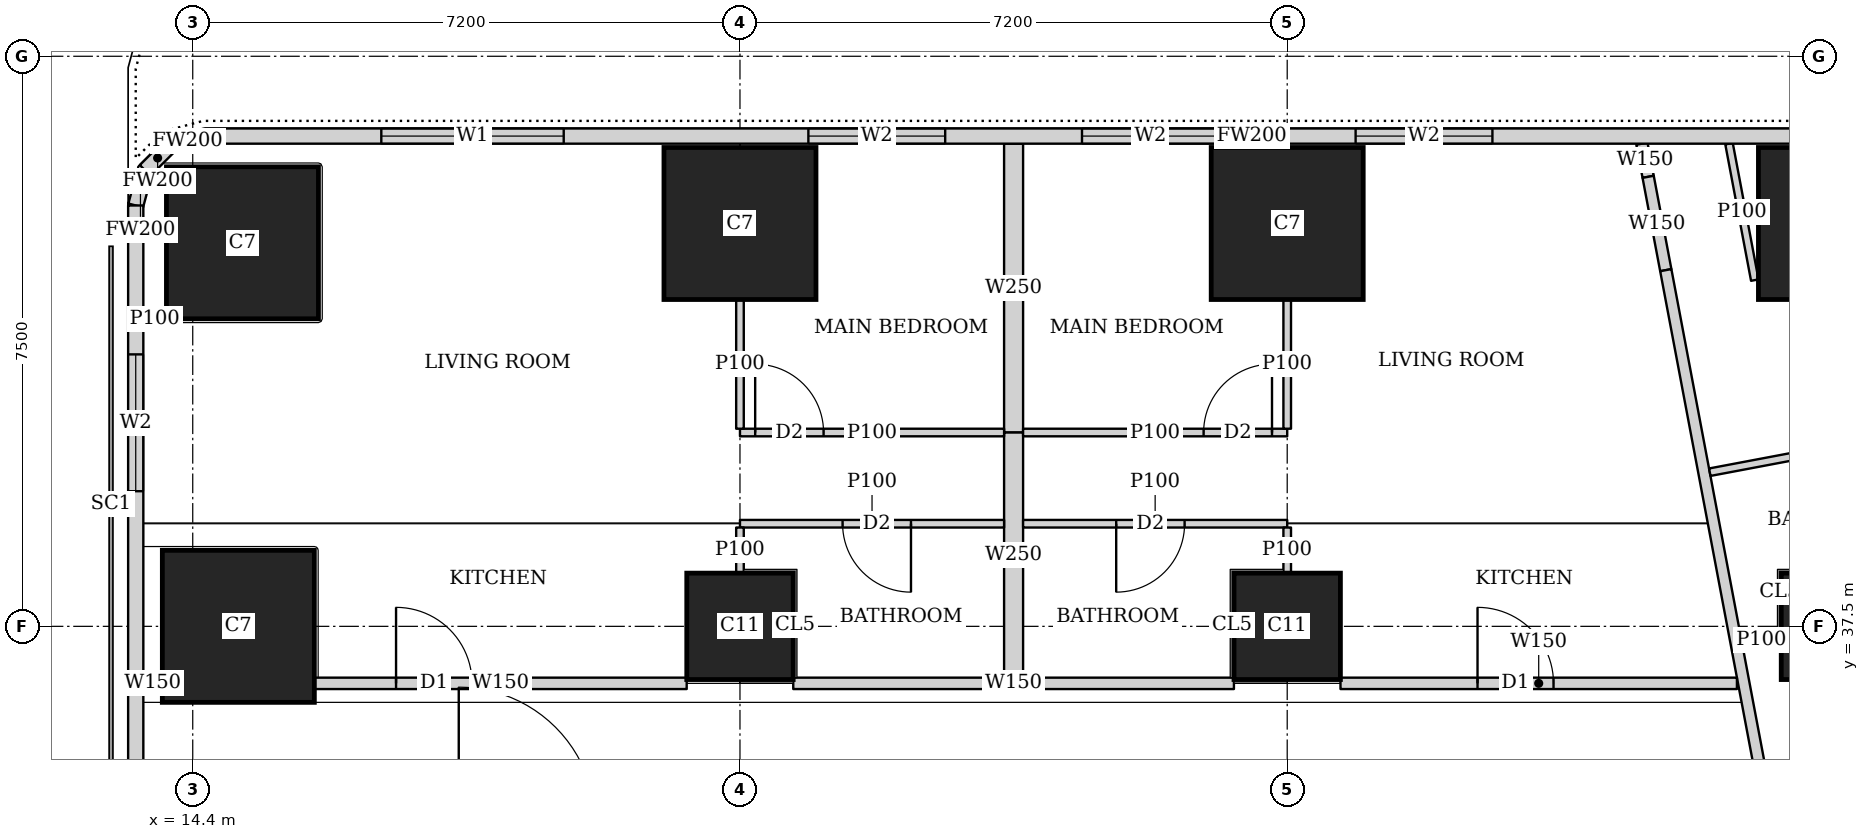
"""IFC4 building model, lengths in metres.
Left out: names, types, materials, properties, quantities, classifications, styles, units other than length and angle.
Written with IfcOpenShell. Run it as: python <this file> out.ifc"""

import sys

from ifc_helpers import new_model, si_unit, direction, frame, frame_2d, origin, origin_2d, place, context, subcontext, project, spatial, rectangle, extrude, element, fill, save


model = new_model("IFC4")
c1 = context("Model", 3, precision=1e-05, world=origin(), true_north=direction((0.0, 1.0)))
c2 = subcontext(c1, "Body", "Model", "MODEL_VIEW")
j1 = project(units=[si_unit("LENGTHUNIT", "METRE"), si_unit("PLANEANGLEUNIT", "RADIAN")], contexts=[c1])
p1 = place(None, origin())
s1 = spatial("IfcSite", under=j1, at=p1, CompositionType="ELEMENT")
p2 = place(p1, origin())
s2 = spatial("IfcBuilding", under=s1, at=p2, CompositionType="ELEMENT")
p3 = place(p2, frame((0.0, 0.0, 251.6)))
s3 = spatial("IfcBuildingStorey", under=s2, at=p3, CompositionType="ELEMENT", Elevation=251.6)
p4 = place(p3, frame((15.0, 37.5, 0.0), z_axis=(0.0, 0.0, 1.0), x_axis=(1.0, 0.0, 0.0)))
e1 = element("IfcColumn", 1, at=p4, inside=s3, PredefinedType="COLUMN", context=c2, shape_type="SweptSolid", body=[
    extrude(rectangle(XDim=2.0, YDim=2.0, at=origin_2d()), origin(), (0.0, 0.0, 1.0), 3.75),
])
for number, where, z_axis, x_axis in (
    (2, (21.6, 37.5, 0.0), (0.0, 0.0, 1.0), (1.0, 0.0, 0.0)),
    (3, (28.8, 37.5, 0.0), (0.0, 0.0, 1.0), (1.0, 0.0, 0.0)),
    (4, (36.0, 37.5, 0.0), (0.0, 0.0, 1.0), (1.0, 0.0, 0.0)),
):
    element("IfcColumn", number, at=place(p3, frame(where, z_axis=z_axis, x_axis=x_axis)), inside=s3, PredefinedType="COLUMN", context=c2, shape_type="SweptSolid", body=[
        extrude(rectangle(XDim=1.4, YDim=1.4, at=origin_2d()), origin(), (0.0, 0.0, 1.0), 3.75),
    ])
for number, where, z_axis, x_axis in (
    (5, (15.054, 42.546, -0.25), (0.0, 0.0, 1.0), (1.0, 0.0, 0.0)),
    (6, (21.6, 42.8, -0.25), (0.0, 0.0, 1.0), (1.0, 0.0, 0.0)),
    (7, (28.8, 42.8, -0.25), (0.0, 0.0, 1.0), (1.0, 0.0, 0.0)),
    (8, (36.0, 42.8, -0.25), (0.0, 0.0, 1.0), (1.0, 0.0, 0.0)),
):
    element("IfcColumn", number, at=place(p3, frame(where, z_axis=z_axis, x_axis=x_axis)), inside=s3, PredefinedType="COLUMN", context=c2, shape_type="SweptSolid", body=[
        extrude(rectangle(XDim=2.0, YDim=2.0, at=origin_2d()), origin(), (0.0, 0.0, 1.0), 4.0),
    ])
p5 = place(p3, frame((42.103, 43.95, 0.0), z_axis=(0.0, 0.0, 1.0), x_axis=(-1.0, 0.0, 0.0)))
e9 = element("IfcWall", 9, at=p5, inside=s3, PredefinedType="SOLIDWALL", context=c2, shape_type="SweptSolid", body=[
    extrude(rectangle(XDim=27.54, YDim=0.2, at=frame_2d((13.77, 0.0))), origin(), (0.0, 0.0, 1.0), 3.5),
])
p6 = place(p5, frame((10.603, 0.0, 0.9)))
e10 = element("IfcOpeningElement", 10, at=p6, cuts=e9, PredefinedType="OPENING", context=c2, shape_type="SweptSolid", body=[
    extrude(rectangle(XDim=1.8, YDim=1.5, at=frame_2d((0.9, 0.75))), frame((0.0, 0.11, 0.0), z_axis=(0.0, -1.0, 0.0), x_axis=(1.0, 0.0, 0.0)), (0.0, 0.0, 1.0), 0.22),
])
p7 = place(p5, frame((14.203, 0.0, 0.9)))
e11 = element("IfcOpeningElement", 11, at=p7, cuts=e9, PredefinedType="OPENING", context=c2, shape_type="SweptSolid", body=[
    extrude(rectangle(XDim=1.8, YDim=1.5, at=frame_2d((0.9, 0.75))), frame((0.0, 0.11, 0.0), z_axis=(0.0, -1.0, 0.0), x_axis=(1.0, 0.0, 0.0)), (0.0, 0.0, 1.0), 0.22),
])
p8 = place(p5, frame((17.803, 0.0, 0.9)))
e12 = element("IfcOpeningElement", 12, at=p8, cuts=e9, PredefinedType="OPENING", context=c2, shape_type="SweptSolid", body=[
    extrude(rectangle(XDim=1.8, YDim=1.5, at=frame_2d((0.9, 0.75))), frame((0.0, 0.11, 0.0), z_axis=(0.0, -1.0, 0.0), x_axis=(1.0, 0.0, 0.0)), (0.0, 0.0, 1.0), 0.22),
])
p9 = place(p5, frame((22.822, 0.0, 0.9)))
e13 = element("IfcOpeningElement", 13, at=p9, cuts=e9, PredefinedType="OPENING", context=c2, shape_type="SweptSolid", body=[
    extrude(rectangle(XDim=2.4, YDim=1.5, at=frame_2d((1.2, 0.75))), frame((0.0, 0.11, 0.0), z_axis=(0.0, -1.0, 0.0), x_axis=(1.0, 0.0, 0.0)), (0.0, 0.0, 1.0), 0.22),
])
p10 = place(p3, frame((14.563, 43.95, 0.0), z_axis=(0.0, 0.0, 1.0), x_axis=(-0.965655254015, -0.259826731483, 0.0)))
e14 = element("IfcWall", 14, at=p10, inside=s3, PredefinedType="SOLIDWALL", context=c2, shape_type="SweptSolid", body=[
    extrude(rectangle(XDim=0.477, YDim=0.2, at=frame_2d((0.239, 0.0))), origin(), (0.0, 0.0, 1.0), 3.5),
])
p11 = place(p3, frame((14.102, 43.826, 0.0), z_axis=(0.0, 0.0, 1.0), x_axis=(-0.707369890659, -0.706843573776, 0.0)))
e15 = element("IfcWall", 15, at=p11, inside=s3, PredefinedType="SOLIDWALL", context=c2, shape_type="SweptSolid", body=[
    extrude(rectangle(XDim=0.464, YDim=0.2, at=frame_2d((0.232, 0.0))), origin(), (0.0, 0.0, 1.0), 3.5),
])
p12 = place(p3, frame((13.774, 43.498, 0.0), z_axis=(0.0, 0.0, 1.0), x_axis=(-0.259826731483, -0.965655254015, 0.0)))
e16 = element("IfcWall", 16, at=p12, inside=s3, PredefinedType="SOLIDWALL", context=c2, shape_type="SweptSolid", body=[
    extrude(rectangle(XDim=0.477, YDim=0.2, at=frame_2d((0.239, 0.0))), origin(), (0.0, 0.0, 1.0), 3.5),
])
p13 = place(p3, frame((13.65, 43.037, 0.0), z_axis=(0.0, 0.0, 1.0), x_axis=(0.0, -1.0, 0.0)))
e17 = element("IfcWall", 17, at=p13, inside=s3, PredefinedType="SOLIDWALL", context=c2, shape_type="SweptSolid", body=[
    extrude(rectangle(XDim=35.374, YDim=0.2, at=frame_2d((17.687, 0.0))), origin(), (0.0, 0.0, 1.0), 3.5),
])
p14 = place(p13, frame((1.959, 0.0, 0.9)))
e18 = element("IfcOpeningElement", 18, at=p14, cuts=e17, PredefinedType="OPENING", context=c2, shape_type="SweptSolid", body=[
    extrude(rectangle(XDim=1.8, YDim=1.5, at=frame_2d((0.9, 0.75))), frame((0.0, 0.11, 0.0), z_axis=(0.0, -1.0, 0.0), x_axis=(1.0, 0.0, 0.0)), (0.0, 0.0, 1.0), 0.22),
])
p15 = place(p3, frame((13.75, 36.75, 0.0), z_axis=(0.0, 0.0, 1.0), x_axis=(1.0, 0.0, 0.0)))
e19 = element("IfcWall", 19, at=p15, inside=s3, PredefinedType="SOLIDWALL", context=c2, shape_type="SweptSolid", body=[
    extrude(rectangle(XDim=0.249, YDim=0.15, at=frame_2d((0.125, 0.0))), origin(), (0.0, 0.0, 1.0), 3.5),
])
p16 = place(p3, frame((16.001, 36.75, 0.0), z_axis=(0.0, 0.0, 1.0), x_axis=(1.0, 0.0, 0.0)))
e20 = element("IfcWall", 20, at=p16, inside=s3, PredefinedType="SOLIDWALL", context=c2, shape_type="SweptSolid", body=[
    extrude(rectangle(XDim=4.898, YDim=0.15, at=frame_2d((2.449, 0.0))), origin(), (0.0, 0.0, 1.0), 3.5),
])
p17 = place(p16, frame((1.074, 0.0, 0.0)))
e21 = element("IfcOpeningElement", 21, at=p17, cuts=e20, PredefinedType="OPENING", context=c2, shape_type="SweptSolid", body=[
    extrude(rectangle(XDim=1.0, YDim=2.1, at=frame_2d((0.5, 1.05))), frame((0.0, 0.085, 0.0), z_axis=(0.0, -1.0, 0.0), x_axis=(1.0, 0.0, 0.0)), (0.0, 0.0, 1.0), 0.17),
])
p18 = place(p3, frame((22.301, 36.75, 0.0), z_axis=(0.0, 0.0, 1.0), x_axis=(1.0, 0.0, 0.0)))
e22 = element("IfcWall", 22, at=p18, inside=s3, PredefinedType="SOLIDWALL", context=c2, shape_type="SweptSolid", body=[
    extrude(rectangle(XDim=5.798, YDim=0.15, at=frame_2d((2.899, 0.0))), origin(), (0.0, 0.0, 1.0), 3.5),
])
p19 = place(p3, frame((29.501, 36.75, 0.0), z_axis=(0.0, 0.0, 1.0), x_axis=(1.0, 0.0, 0.0)))
e23 = element("IfcWall", 23, at=p19, inside=s3, PredefinedType="SOLIDWALL", context=c2, shape_type="SweptSolid", body=[
    extrude(rectangle(XDim=5.216, YDim=0.15, at=frame_2d((2.608, 0.0))), origin(), (0.0, 0.0, 1.0), 3.5),
])
p20 = place(p19, frame((1.803, 0.0, 0.0)))
e24 = element("IfcOpeningElement", 24, at=p20, cuts=e23, PredefinedType="OPENING", context=c2, shape_type="SweptSolid", body=[
    extrude(rectangle(XDim=1.0, YDim=2.1, at=frame_2d((0.5, 1.05))), frame((0.0, 0.085, 0.0), z_axis=(0.0, -1.0, 0.0), x_axis=(1.0, 0.0, 0.0)), (0.0, 0.0, 1.0), 0.17),
])
p21 = place(p3, frame((33.467, 43.85, 0.0), z_axis=(0.0, 0.0, 1.0), x_axis=(0.184886516626, -0.982759877066, 0.0)))
e25 = element("IfcWall", 25, at=p21, inside=s3, PredefinedType="SOLIDWALL", context=c2, shape_type="SweptSolid", body=[
    extrude(rectangle(XDim=0.444, YDim=0.15, at=frame_2d((0.222, 0.0))), origin(), (0.0, 0.0, 1.0), 3.5),
])
p22 = place(p3, frame((33.549, 43.414, 0.0), z_axis=(0.0, 0.0, 1.0), x_axis=(0.185585816539, -0.982628060204, 0.0)))
e26 = element("IfcWall", 26, at=p22, inside=s3, PredefinedType="SOLIDWALL", context=c2, shape_type="SweptSolid", body=[
    extrude(rectangle(XDim=1.25, YDim=0.15, at=frame_2d((0.625, 0.0))), origin(), (0.0, 0.0, 1.0), 2.05),
])
p23 = place(p3, frame((33.781, 42.186, 0.0), z_axis=(0.0, 0.0, 1.0), x_axis=(0.185593518645, -0.9826266055, 0.0)))
e27 = element("IfcWall", 27, at=p23, inside=s3, PredefinedType="SOLIDWALL", context=c2, shape_type="SweptSolid", body=[
    extrude(rectangle(XDim=35.961, YDim=0.15, at=frame_2d((17.98, 0.0))), origin(), (0.0, 0.0, 1.0), 2.5),
])
p24 = place(p23, frame((7.183, 0.0, 0.0)))
e28 = element("IfcOpeningElement", 28, at=p24, cuts=e27, PredefinedType="OPENING", context=c2, shape_type="SweptSolid", body=[
    extrude(rectangle(XDim=1.0, YDim=2.1, at=frame_2d((0.5, 1.05))), frame((0.0, 0.085, 0.0), z_axis=(0.0, -1.0, 0.0), x_axis=(1.0, 0.0, 0.0)), (0.0, 0.0, 1.0), 0.17),
])
p25 = place(p23, frame((11.76, 0.0, 0.0)))
e29 = element("IfcOpeningElement", 29, at=p25, cuts=e27, PredefinedType="OPENING", context=c2, shape_type="SweptSolid", body=[
    extrude(rectangle(XDim=1.0, YDim=2.1, at=frame_2d((0.5, 1.05))), frame((0.0, 0.085, 0.0), z_axis=(0.0, -1.0, 0.0), x_axis=(1.0, 0.0, 0.0)), (0.0, 0.0, 1.0), 0.17),
])
p26 = place(p23, frame((23.863, 0.0, 0.0)))
e30 = element("IfcOpeningElement", 30, at=p26, cuts=e27, PredefinedType="OPENING", context=c2, shape_type="SweptSolid", body=[
    extrude(rectangle(XDim=1.0, YDim=2.1, at=frame_2d((0.5, 1.05))), frame((0.0, 0.085, 0.0), z_axis=(0.0, -1.0, 0.0), x_axis=(1.0, 0.0, 0.0)), (0.0, 0.0, 1.0), 0.17),
])
p27 = place(p23, frame((30.502, 0.0, 0.0)))
e31 = element("IfcOpeningElement", 31, at=p27, cuts=e27, PredefinedType="OPENING", context=c2, shape_type="SweptSolid", body=[
    extrude(rectangle(XDim=1.0, YDim=2.1, at=frame_2d((0.5, 1.05))), frame((0.0, 0.085, 0.0), z_axis=(0.0, -1.0, 0.0), x_axis=(1.0, 0.0, 0.0)), (0.0, 0.0, 1.0), 0.17),
])
p28 = place(p3, frame((34.952, 42.055, 0.0), z_axis=(0.0, 0.0, 1.0), x_axis=(-0.185490642006, 0.98264603074, 0.0)))
e32 = element("IfcWall", 32, at=p28, inside=s3, PredefinedType="PARTITIONING", context=c2, shape_type="SweptSolid", body=[
    extrude(rectangle(XDim=1.827, YDim=0.1, at=frame_2d((0.914, 0.0))), origin(), (0.0, 0.0, 1.0), 2.05),
])
p29 = place(p3, frame((37.823, 40.182, 0.0), z_axis=(0.0, 0.0, 1.0), x_axis=(-0.98263926043, -0.185526504472, 0.0)))
e33 = element("IfcWall", 33, at=p29, inside=s3, PredefinedType="PARTITIONING", context=c2, shape_type="SweptSolid", body=[
    extrude(rectangle(XDim=3.524, YDim=0.1, at=frame_2d((1.762, 0.0))), origin(), (0.0, 0.0, 1.0), 3.5),
])
p30 = place(p3, frame((35.29, 37.366, 0.0), z_axis=(0.0, 0.0, 1.0), x_axis=(-0.982715597703, -0.185121727606, 0.0)))
e34 = element("IfcWall", 34, at=p30, inside=s3, PredefinedType="PARTITIONING", context=c2, shape_type="SweptSolid", body=[
    extrude(rectangle(XDim=0.513, YDim=0.1, at=frame_2d((0.256, 0.0))), origin(), (0.0, 0.0, 1.0), 3.5),
])
p31 = place(p3, frame((14.054, 41.546, 0.0), z_axis=(0.0, 0.0, 1.0), x_axis=(-1.0, 0.0, 0.0)))
e35 = element("IfcWall", 35, at=p31, inside=s3, PredefinedType="PARTITIONING", context=c2, shape_type="SweptSolid", body=[
    extrude(rectangle(XDim=0.304, YDim=0.1, at=frame_2d((0.152, 0.0))), origin(), (0.0, 0.0, 1.0), 3.5),
])
p32 = place(p3, frame((21.6, 40.05, 0.0), z_axis=(0.0, 0.0, 1.0), x_axis=(1.0, 0.0, 0.0)))
e36 = element("IfcWall", 36, at=p32, inside=s3, PredefinedType="PARTITIONING", context=c2, shape_type="SweptSolid", body=[
    extrude(rectangle(XDim=3.475, YDim=0.1, at=frame_2d((1.737, 0.0))), origin(), (0.0, 0.0, 1.0), 3.5),
])
p33 = place(p32, frame((0.2, 0.0, 0.0)))
e37 = element("IfcOpeningElement", 37, at=p33, cuts=e36, PredefinedType="OPENING", context=c2, shape_type="SweptSolid", body=[
    extrude(rectangle(XDim=0.9, YDim=2.1, at=frame_2d((0.45, 1.05))), frame((0.0, 0.06, 0.0), z_axis=(0.0, -1.0, 0.0), x_axis=(1.0, 0.0, 0.0)), (0.0, 0.0, 1.0), 0.12),
])
p34 = place(p3, frame((21.6, 38.85, 0.0), z_axis=(0.0, 0.0, 1.0), x_axis=(1.0, 0.0, 0.0)))
e38 = element("IfcWall", 38, at=p34, inside=s3, PredefinedType="PARTITIONING", context=c2, shape_type="SweptSolid", body=[
    extrude(rectangle(XDim=3.475, YDim=0.1, at=frame_2d((1.737, 0.0))), origin(), (0.0, 0.0, 1.0), 3.5),
])
p35 = place(p34, frame((1.35, 0.0, 0.0)))
e39 = element("IfcOpeningElement", 39, at=p35, cuts=e38, PredefinedType="OPENING", context=c2, shape_type="SweptSolid", body=[
    extrude(rectangle(XDim=0.9, YDim=2.1, at=frame_2d((0.45, 1.05))), frame((0.0, 0.06, 0.0), z_axis=(0.0, -1.0, 0.0), x_axis=(1.0, 0.0, 0.0)), (0.0, 0.0, 1.0), 0.12),
])
p36 = place(p3, frame((21.6, 40.1, 0.0), z_axis=(0.0, 0.0, 1.0), x_axis=(0.0, 1.0, 0.0)))
e40 = element("IfcWall", 40, at=p36, inside=s3, PredefinedType="PARTITIONING", context=c2, shape_type="SweptSolid", body=[
    extrude(rectangle(XDim=1.699, YDim=0.1, at=frame_2d((0.85, 0.0))), origin(), (0.0, 0.0, 1.0), 3.5),
])
p37 = place(p3, frame((21.6, 38.201, 0.0), z_axis=(0.0, 0.0, 1.0), x_axis=(0.0, 1.0, 0.0)))
e41 = element("IfcWall", 41, at=p37, inside=s3, PredefinedType="PARTITIONING", context=c2, shape_type="SweptSolid", body=[
    extrude(rectangle(XDim=0.599, YDim=0.1, at=frame_2d((0.3, 0.0))), origin(), (0.0, 0.0, 1.0), 3.5),
])
p38 = place(p3, frame((25.325, 40.05, 0.0), z_axis=(0.0, 0.0, 1.0), x_axis=(1.0, 0.0, 0.0)))
e42 = element("IfcWall", 42, at=p38, inside=s3, PredefinedType="PARTITIONING", context=c2, shape_type="SweptSolid", body=[
    extrude(rectangle(XDim=3.475, YDim=0.1, at=frame_2d((1.738, 0.0))), origin(), (0.0, 0.0, 1.0), 3.5),
])
p39 = place(p38, frame((2.375, 0.0, 0.0)))
e43 = element("IfcOpeningElement", 43, at=p39, cuts=e42, PredefinedType="OPENING", context=c2, shape_type="SweptSolid", body=[
    extrude(rectangle(XDim=0.9, YDim=2.1, at=frame_2d((0.45, 1.05))), frame((0.0, 0.06, 0.0), z_axis=(0.0, -1.0, 0.0), x_axis=(1.0, 0.0, 0.0)), (0.0, 0.0, 1.0), 0.12),
])
p40 = place(p3, frame((25.325, 38.85, 0.0), z_axis=(0.0, 0.0, 1.0), x_axis=(1.0, 0.0, 0.0)))
e44 = element("IfcWall", 44, at=p40, inside=s3, PredefinedType="PARTITIONING", context=c2, shape_type="SweptSolid", body=[
    extrude(rectangle(XDim=3.475, YDim=0.1, at=frame_2d((1.738, 0.0))), origin(), (0.0, 0.0, 1.0), 3.5),
])
p41 = place(p40, frame((1.225, 0.0, 0.0)))
e45 = element("IfcOpeningElement", 45, at=p41, cuts=e44, PredefinedType="OPENING", context=c2, shape_type="SweptSolid", body=[
    extrude(rectangle(XDim=0.9, YDim=2.1, at=frame_2d((0.45, 1.05))), frame((0.0, 0.06, 0.0), z_axis=(0.0, -1.0, 0.0), x_axis=(1.0, 0.0, 0.0)), (0.0, 0.0, 1.0), 0.12),
])
p42 = place(p3, frame((28.8, 40.1, 0.0), z_axis=(0.0, 0.0, 1.0), x_axis=(0.0, 1.0, 0.0)))
e46 = element("IfcWall", 46, at=p42, inside=s3, PredefinedType="PARTITIONING", context=c2, shape_type="SweptSolid", body=[
    extrude(rectangle(XDim=1.699, YDim=0.1, at=frame_2d((0.85, 0.0))), origin(), (0.0, 0.0, 1.0), 3.5),
])
p43 = place(p3, frame((28.8, 38.201, 0.0), z_axis=(0.0, 0.0, 1.0), x_axis=(0.0, 1.0, 0.0)))
e47 = element("IfcWall", 47, at=p43, inside=s3, PredefinedType="PARTITIONING", context=c2, shape_type="SweptSolid", body=[
    extrude(rectangle(XDim=0.599, YDim=0.1, at=frame_2d((0.3, 0.0))), origin(), (0.0, 0.0, 1.0), 3.5),
])
p44 = place(p3, frame((25.2, 40.05, 0.0), z_axis=(0.0, 0.0, 1.0), x_axis=(0.0, 1.0, 0.0)))
e48 = element("IfcWall", 48, at=p44, inside=s3, PredefinedType="SOLIDWALL", context=c2, shape_type="SweptSolid", body=[
    extrude(rectangle(XDim=3.8, YDim=0.25, at=frame_2d((1.9, 0.0))), origin(), (0.0, 0.0, 1.0), 2.05),
])
p45 = place(p3, frame((25.2, 36.825, 0.0), z_axis=(0.0, 0.0, 1.0), x_axis=(0.0, 1.0, 0.0)))
e49 = element("IfcWall", 49, at=p45, inside=s3, PredefinedType="SOLIDWALL", context=c2, shape_type="SweptSolid", body=[
    extrude(rectangle(XDim=3.225, YDim=0.25, at=frame_2d((1.613, 0.0))), origin(), (0.0, 0.0, 1.0), 3.5),
])
p46 = place(p6, origin())
e50 = element("IfcWindow", 50, at=p46, inside=s3, PartitioningType="SINGLE_PANEL", PredefinedType="WINDOW", context=c2, shape_type="SweptSolid", body=[
    extrude(rectangle(XDim=1.8, YDim=1.5, at=frame_2d((0.9, 0.75))), frame((0.0, 0.03, 0.0), z_axis=(0.0, -1.0, 0.0), x_axis=(1.0, 0.0, 0.0)), (0.0, 0.0, 1.0), 0.06),
])
fill(e10, e50)
p47 = place(p7, origin())
e51 = element("IfcWindow", 51, at=p47, inside=s3, PartitioningType="SINGLE_PANEL", PredefinedType="WINDOW", context=c2, shape_type="SweptSolid", body=[
    extrude(rectangle(XDim=1.8, YDim=1.5, at=frame_2d((0.9, 0.75))), frame((0.0, 0.03, 0.0), z_axis=(0.0, -1.0, 0.0), x_axis=(1.0, 0.0, 0.0)), (0.0, 0.0, 1.0), 0.06),
])
fill(e11, e51)
p48 = place(p8, origin())
e52 = element("IfcWindow", 52, at=p48, inside=s3, PartitioningType="SINGLE_PANEL", PredefinedType="WINDOW", context=c2, shape_type="SweptSolid", body=[
    extrude(rectangle(XDim=1.8, YDim=1.5, at=frame_2d((0.9, 0.75))), frame((0.0, 0.03, 0.0), z_axis=(0.0, -1.0, 0.0), x_axis=(1.0, 0.0, 0.0)), (0.0, 0.0, 1.0), 0.06),
])
fill(e12, e52)
p49 = place(p9, origin())
e53 = element("IfcWindow", 53, at=p49, inside=s3, PartitioningType="SINGLE_PANEL", PredefinedType="WINDOW", context=c2, shape_type="SweptSolid", body=[
    extrude(rectangle(XDim=2.4, YDim=1.5, at=frame_2d((1.2, 0.75))), frame((0.0, 0.03, 0.0), z_axis=(0.0, -1.0, 0.0), x_axis=(1.0, 0.0, 0.0)), (0.0, 0.0, 1.0), 0.06),
])
fill(e13, e53)
p50 = place(p14, origin())
e54 = element("IfcWindow", 54, at=p50, inside=s3, PartitioningType="SINGLE_PANEL", PredefinedType="WINDOW", context=c2, shape_type="SweptSolid", body=[
    extrude(rectangle(XDim=1.8, YDim=1.5, at=frame_2d((0.9, 0.75))), frame((0.0, 0.03, 0.0), z_axis=(0.0, -1.0, 0.0), x_axis=(1.0, 0.0, 0.0)), (0.0, 0.0, 1.0), 0.06),
])
fill(e18, e54)
p51 = place(p33, origin())
e55 = element("IfcDoor", 55, at=p51, inside=s3, OperationType="SINGLE_SWING_LEFT", PredefinedType="DOOR", context=c2, shape_type="SweptSolid", body=[
    extrude(rectangle(XDim=0.9, YDim=2.1, at=frame_2d((0.45, 1.05))), frame((0.0, 0.025, 0.0), z_axis=(0.0, -1.0, 0.0), x_axis=(1.0, 0.0, 0.0)), (0.0, 0.0, 1.0), 0.05),
])
fill(e37, e55)
p52 = place(p35, origin())
e56 = element("IfcDoor", 56, at=p52, inside=s3, OperationType="SINGLE_SWING_LEFT", PredefinedType="DOOR", context=c2, shape_type="SweptSolid", body=[
    extrude(rectangle(XDim=0.9, YDim=2.1, at=frame_2d((0.45, 1.05))), frame((0.0, 0.025, 0.0), z_axis=(0.0, -1.0, 0.0), x_axis=(1.0, 0.0, 0.0)), (0.0, 0.0, 1.0), 0.05),
])
fill(e39, e56)
p53 = place(p17, origin())
e57 = element("IfcDoor", 57, at=p53, inside=s3, OperationType="SINGLE_SWING_LEFT", PredefinedType="DOOR", context=c2, shape_type="SweptSolid", body=[
    extrude(rectangle(XDim=1.0, YDim=2.1, at=frame_2d((0.5, 1.05))), frame((0.0, 0.025, 0.0), z_axis=(0.0, -1.0, 0.0), x_axis=(1.0, 0.0, 0.0)), (0.0, 0.0, 1.0), 0.05),
])
fill(e21, e57)
p54 = place(p39, origin())
e58 = element("IfcDoor", 58, at=p54, inside=s3, OperationType="SINGLE_SWING_RIGHT", PredefinedType="DOOR", context=c2, shape_type="SweptSolid", body=[
    extrude(rectangle(XDim=0.9, YDim=2.1, at=frame_2d((0.45, 1.05))), frame((0.0, 0.025, 0.0), z_axis=(0.0, -1.0, 0.0), x_axis=(1.0, 0.0, 0.0)), (0.0, 0.0, 1.0), 0.05),
])
fill(e43, e58)
p55 = place(p41, origin())
e59 = element("IfcDoor", 59, at=p55, inside=s3, OperationType="SINGLE_SWING_RIGHT", PredefinedType="DOOR", context=c2, shape_type="SweptSolid", body=[
    extrude(rectangle(XDim=0.9, YDim=2.1, at=frame_2d((0.45, 1.05))), frame((0.0, 0.025, 0.0), z_axis=(0.0, -1.0, 0.0), x_axis=(1.0, 0.0, 0.0)), (0.0, 0.0, 1.0), 0.05),
])
fill(e45, e59)
p56 = place(p20, origin())
e60 = element("IfcDoor", 60, at=p56, inside=s3, OperationType="SINGLE_SWING_LEFT", PredefinedType="DOOR", context=c2, shape_type="SweptSolid", body=[
    extrude(rectangle(XDim=1.0, YDim=2.1, at=frame_2d((0.5, 1.05))), frame((0.0, 0.025, 0.0), z_axis=(0.0, -1.0, 0.0), x_axis=(1.0, 0.0, 0.0)), (0.0, 0.0, 1.0), 0.05),
])
fill(e24, e60)
save(model, sys.argv[1])
